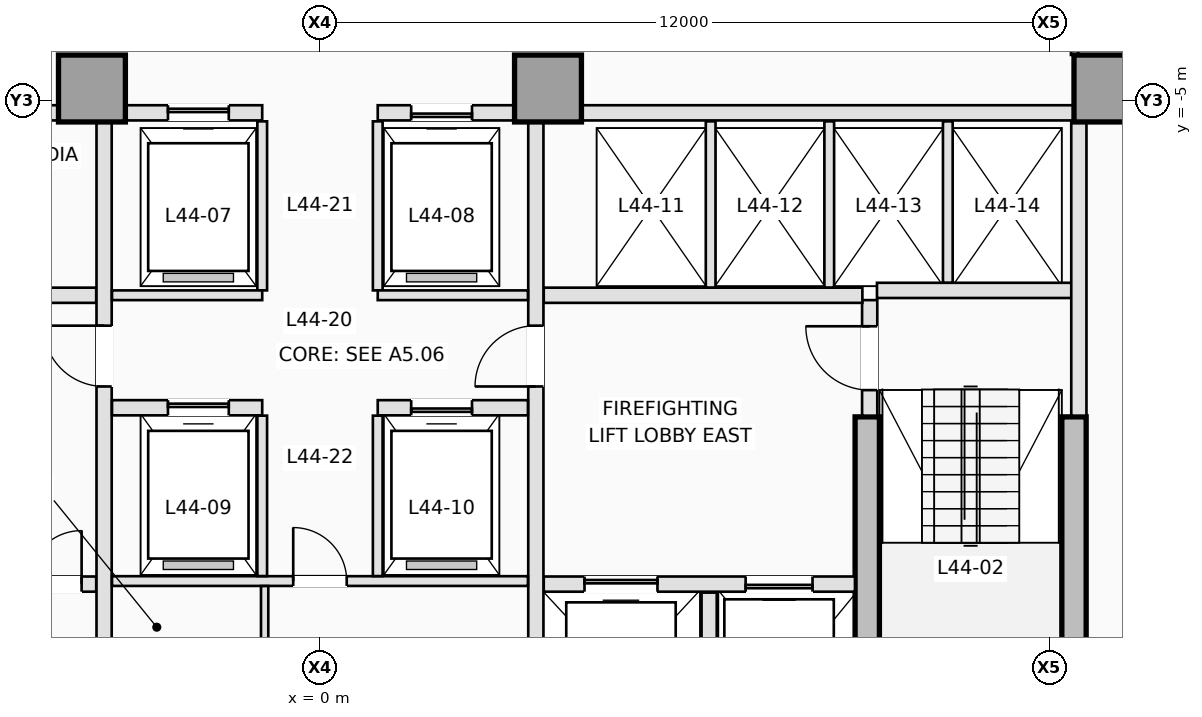
"""IFC4 building model, lengths in metres.
Left out: names, types, materials, properties, quantities, classifications, styles, units other than length and angle.
Written with IfcOpenShell. Run it as: python <this file> out.ifc"""

import sys

from ifc_helpers import new_model, si_unit, direction, frame, frame_2d, origin, origin_2d, place, context, subcontext, project, spatial, rectangle, extrude, element, fill, save


model = new_model("IFC4")
c1 = context("Model", 3, precision=1e-05, world=origin(), true_north=direction((0.0, 1.0)))
c2 = subcontext(c1, "Body", "Model", "MODEL_VIEW")
j1 = project(units=[si_unit("LENGTHUNIT", "METRE"), si_unit("PLANEANGLEUNIT", "RADIAN")], contexts=[c1])
p1 = place(None, origin())
s1 = spatial("IfcSite", under=j1, at=p1, CompositionType="ELEMENT")
p2 = place(p1, origin())
s2 = spatial("IfcBuilding", under=s1, at=p2, CompositionType="ELEMENT")
p3 = place(p2, frame((0.0, 0.0, 161.5)))
s3 = spatial("IfcBuildingStorey", under=s2, at=p3, CompositionType="ELEMENT", Elevation=161.5)
p4 = place(p3, frame((12.4, -15.7, 0.0), z_axis=(0.0, 0.0, 1.0), x_axis=(0.0, 1.0, 0.0)))
e1 = element("IfcWall", 1, at=p4, inside=s3, PredefinedType="SHEAR", context=c2, shape_type="SweptSolid", body=[
    extrude(rectangle(XDim=5.5, YDim=0.4, at=frame_2d((2.75, 0.0))), origin(), (0.0, 0.0, 1.0), 3.5),
])
p5 = place(p3, frame((9.0, -16.15, 0.0), z_axis=(0.0, 0.0, 1.0), x_axis=(0.0, 1.0, 0.0)))
e2 = element("IfcWall", 2, at=p5, inside=s3, PredefinedType="SHEAR", context=c2, shape_type="SweptSolid", body=[
    extrude(rectangle(XDim=5.95, YDim=0.4, at=frame_2d((2.975, 0.0))), origin(), (0.0, 0.0, 1.0), 3.5),
])
for number, where, z_axis, x_axis in (
    (3, (-3.75, -4.8, 0.0), (0.0, 0.0, 1.0), (1.0, 0.0, 0.0)),
    (4, (3.75, -4.8, 0.0), (0.0, 0.0, 1.0), (1.0, 0.0, 0.0)),
    (5, (12.95, -4.8, 0.0), (0.0, 0.0, 1.0), (1.0, 0.0, 0.0)),
):
    element("IfcColumn", number, at=place(p3, frame(where, z_axis=z_axis, x_axis=x_axis)), inside=s3, PredefinedType="COLUMN", context=c2, shape_type="SweptSolid", body=[
        extrude(rectangle(XDim=1.1, YDim=1.1, at=origin_2d()), origin(), (0.0, 0.0, 1.0), 3.5),
    ])
p6 = place(p3, frame((9.04, -10.18, 0.0), z_axis=(0.0, 0.0, 1.0), x_axis=(0.0, 1.0, 0.0)))
e6 = element("IfcWall", 6, at=p6, inside=s3, PredefinedType="PARTITIONING", context=c2, shape_type="SweptSolid", body=[
    extrude(rectangle(XDim=1.9, YDim=0.25, at=frame_2d((0.95, 0.0))), origin(), (0.0, 0.0, 1.0), 3.25),
])
p7 = place(p6, frame((0.42, 0.0, 0.0)))
e7 = element("IfcOpeningElement", 7, at=p7, cuts=e6, PredefinedType="OPENING", context=c2, shape_type="SweptSolid", body=[
    extrude(rectangle(XDim=1.05, YDim=2.15, at=frame_2d((0.525, 1.075))), frame((0.0, 0.135, 0.0), z_axis=(0.0, -1.0, 0.0), x_axis=(1.0, 0.0, 0.0)), (0.0, 0.0, 1.0), 0.27),
])
p8 = place(p3, frame((9.16, -8.12, 0.0), z_axis=(0.0, 0.0, 1.0), x_axis=(1.0, 0.0, 0.0)))
e8 = element("IfcWall", 8, at=p8, inside=s3, PredefinedType="PARTITIONING", context=c2, shape_type="SweptSolid", body=[
    extrude(rectangle(XDim=3.22, YDim=0.25, at=frame_2d((1.61, 0.0))), origin(), (0.0, 0.0, 1.0), 3.25),
])
p9 = place(p3, frame((12.48, -10.18, 0.0), z_axis=(0.0, 0.0, 1.0), x_axis=(0.0, 1.0, 0.0)))
e9 = element("IfcWall", 9, at=p9, inside=s3, PredefinedType="PARTITIONING", context=c2, shape_type="SweptSolid", body=[
    extrude(rectangle(XDim=4.828, YDim=0.25, at=frame_2d((2.414, 0.0))), origin(), (0.0, 0.0, 1.0), 3.25),
])
p10 = place(p3, frame((-8.798, -12.95, 0.0), z_axis=(0.0, 0.0, 1.0), x_axis=(1.0, 0.0, 0.0)))
e10 = element("IfcWall", 10, at=p10, inside=s3, PredefinedType="PARTITIONING", context=c2, shape_type="SweptSolid", body=[
    extrude(rectangle(XDim=5.118, YDim=0.25, at=frame_2d((2.559, 0.0))), origin(), (0.0, 0.0, 1.0), 3.25),
])
p11 = place(p10, frame((0.698, 0.0, 0.0)))
e11 = element("IfcOpeningElement", 11, at=p11, cuts=e10, PredefinedType="OPENING", context=c2, shape_type="SweptSolid", body=[
    extrude(rectangle(XDim=1.1, YDim=2.15, at=frame_2d((0.55, 1.075))), frame((0.0, 0.135, 0.0), z_axis=(0.0, -1.0, 0.0), x_axis=(1.0, 0.0, 0.0)), (0.0, 0.0, 1.0), 0.27),
])
p12 = place(p10, frame((2.598, 0.0, 0.0)))
e12 = element("IfcOpeningElement", 12, at=p12, cuts=e10, PredefinedType="OPENING", context=c2, shape_type="SweptSolid", body=[
    extrude(rectangle(XDim=0.88, YDim=2.1, at=frame_2d((0.44, 1.05))), frame((0.0, 0.135, 0.0), z_axis=(0.0, -1.0, 0.0), x_axis=(1.0, 0.0, 0.0)), (0.0, 0.0, 1.0), 0.27),
])
p13 = place(p10, frame((3.998, 0.0, 0.0)))
e13 = element("IfcOpeningElement", 13, at=p13, cuts=e10, PredefinedType="OPENING", context=c2, shape_type="SweptSolid", body=[
    extrude(rectangle(XDim=0.88, YDim=2.1, at=frame_2d((0.44, 1.05))), frame((0.0, 0.135, 0.0), z_axis=(0.0, -1.0, 0.0), x_axis=(1.0, 0.0, 0.0)), (0.0, 0.0, 1.0), 0.27),
])
p14 = place(p3, frame((3.68, -12.95, 0.0), z_axis=(0.0, 0.0, 1.0), x_axis=(1.0, 0.0, 0.0)))
e14 = element("IfcWall", 14, at=p14, inside=s3, PredefinedType="PARTITIONING", context=c2, shape_type="SweptSolid", body=[
    extrude(rectangle(XDim=5.118, YDim=0.25, at=frame_2d((2.559, 0.0))), origin(), (0.0, 0.0, 1.0), 3.25),
])
p15 = place(p14, frame((3.32, 0.0, 0.0)))
e15 = element("IfcOpeningElement", 15, at=p15, cuts=e14, PredefinedType="OPENING", context=c2, shape_type="SweptSolid", body=[
    extrude(rectangle(XDim=1.1, YDim=2.15, at=frame_2d((0.55, 1.075))), frame((0.0, 0.135, 0.0), z_axis=(0.0, -1.0, 0.0), x_axis=(1.0, 0.0, 0.0)), (0.0, 0.0, 1.0), 0.27),
])
p16 = place(p14, frame((0.67, 0.0, 0.0)))
e16 = element("IfcOpeningElement", 16, at=p16, cuts=e14, PredefinedType="OPENING", context=c2, shape_type="SweptSolid", body=[
    extrude(rectangle(XDim=1.2, YDim=2.15, at=frame_2d((0.6, 1.075))), frame((0.0, 0.135, 0.0), z_axis=(0.0, -1.0, 0.0), x_axis=(1.0, 0.0, 0.0)), (0.0, 0.0, 1.0), 0.27),
])
p17 = place(p3, frame((6.4, -15.92, 0.0), z_axis=(0.0, 0.0, 1.0), x_axis=(0.0, 1.0, 0.0)))
e17 = element("IfcWall", 17, at=p17, inside=s3, PredefinedType="PARTITIONING", context=c2, shape_type="SweptSolid", body=[
    extrude(rectangle(XDim=2.83, YDim=0.25, at=frame_2d((1.415, 0.0))), origin(), (0.0, 0.0, 1.0), 3.25),
])
for number, where, z_axis, x_axis in (
    (18, (-8.92, -8.2, 0.0), (0.0, 0.0, 1.0), (1.0, 0.0, 0.0)),
    (19, (3.68, -8.2, 0.0), (0.0, 0.0, 1.0), (1.0, 0.0, 0.0)),
):
    element("IfcWall", number, at=place(p3, frame(where, z_axis=z_axis, x_axis=x_axis)), inside=s3, PredefinedType="PARTITIONING", context=c2, shape_type="SweptSolid", body=[
        extrude(rectangle(XDim=5.24, YDim=0.25, at=frame_2d((2.62, 0.0))), origin(), (0.0, 0.0, 1.0), 3.25),
    ])
p18 = place(p3, frame((-3.55, -15.798, 0.0), z_axis=(0.0, 0.0, 1.0), x_axis=(0.0, 1.0, 0.0)))
e20 = element("IfcWall", 20, at=p18, inside=s3, PredefinedType="PARTITIONING", context=c2, shape_type="SweptSolid", body=[
    extrude(rectangle(XDim=10.446, YDim=0.25, at=frame_2d((5.223, 0.0))), origin(), (0.0, 0.0, 1.0), 3.25),
])
p19 = place(p18, frame((6.098, 0.0, 0.0)))
e21 = element("IfcOpeningElement", 21, at=p19, cuts=e20, PredefinedType="OPENING", context=c2, shape_type="SweptSolid", body=[
    extrude(rectangle(XDim=1.0, YDim=2.15, at=frame_2d((0.5, 1.075))), frame((0.0, 0.135, 0.0), z_axis=(0.0, -1.0, 0.0), x_axis=(1.0, 0.0, 0.0)), (0.0, 0.0, 1.0), 0.27),
])
p20 = place(p3, frame((3.55, -15.798, 0.0), z_axis=(0.0, 0.0, 1.0), x_axis=(0.0, 1.0, 0.0)))
e22 = element("IfcWall", 22, at=p20, inside=s3, PredefinedType="PARTITIONING", context=c2, shape_type="SweptSolid", body=[
    extrude(rectangle(XDim=10.446, YDim=0.25, at=frame_2d((5.223, 0.0))), origin(), (0.0, 0.0, 1.0), 3.25),
])
p21 = place(p20, frame((6.098, 0.0, 0.0)))
e23 = element("IfcOpeningElement", 23, at=p21, cuts=e22, PredefinedType="OPENING", context=c2, shape_type="SweptSolid", body=[
    extrude(rectangle(XDim=1.0, YDim=2.15, at=frame_2d((0.5, 1.075))), frame((0.0, 0.135, 0.0), z_axis=(0.0, -1.0, 0.0), x_axis=(1.0, 0.0, 0.0)), (0.0, 0.0, 1.0), 0.27),
])
p22 = place(p3, frame((-12.398, -5.2, 0.0), z_axis=(0.0, 0.0, 1.0), x_axis=(1.0, 0.0, 0.0)))
e24 = element("IfcWall", 24, at=p22, inside=s3, PredefinedType="PARTITIONING", context=c2, shape_type="SweptSolid", body=[
    extrude(rectangle(XDim=8.096, YDim=0.25, at=frame_2d((4.048, 0.0))), origin(), (0.0, 0.0, 1.0), 3.25),
])
p23 = place(p22, frame((2.968, 0.0, 0.0)))
e25 = element("IfcOpeningElement", 25, at=p23, cuts=e24, PredefinedType="OPENING", context=c2, shape_type="SweptSolid", body=[
    extrude(rectangle(XDim=0.92, YDim=2.12, at=frame_2d((0.46, 1.06))), frame((0.0, 0.135, 0.0), z_axis=(0.0, -1.0, 0.0), x_axis=(1.0, 0.0, 0.0)), (0.0, 0.0, 1.0), 0.27),
])
p24 = place(p22, frame((6.068, 0.0, 0.0)))
e26 = element("IfcOpeningElement", 26, at=p24, cuts=e24, PredefinedType="OPENING", context=c2, shape_type="SweptSolid", body=[
    extrude(rectangle(XDim=0.92, YDim=2.12, at=frame_2d((0.46, 1.06))), frame((0.0, 0.135, 0.0), z_axis=(0.0, -1.0, 0.0), x_axis=(1.0, 0.0, 0.0)), (0.0, 0.0, 1.0), 0.27),
])
p25 = place(p3, frame((4.302, -5.2, 0.0), z_axis=(0.0, 0.0, 1.0), x_axis=(1.0, 0.0, 0.0)))
e27 = element("IfcWall", 27, at=p25, inside=s3, PredefinedType="PARTITIONING", context=c2, shape_type="SweptSolid", body=[
    extrude(rectangle(XDim=8.096, YDim=0.25, at=frame_2d((4.048, 0.0))), origin(), (0.0, 0.0, 1.0), 3.25),
])
p26 = place(p3, frame((-3.198, -5.2, 0.0), z_axis=(0.0, 0.0, 1.0), x_axis=(1.0, 0.0, 0.0)))
e28 = element("IfcWall", 28, at=p26, inside=s3, PredefinedType="PARTITIONING", context=c2, shape_type="SweptSolid", body=[
    extrude(rectangle(XDim=2.248, YDim=0.25, at=frame_2d((1.124, 0.0))), origin(), (0.0, 0.0, 1.0), 3.25),
])
p27 = place(p26, frame((0.698, 0.0, 0.0)))
e29 = element("IfcOpeningElement", 29, at=p27, cuts=e28, PredefinedType="OPENING", context=c2, shape_type="SweptSolid", body=[
    extrude(rectangle(XDim=1.0, YDim=2.15, at=frame_2d((0.5, 1.075))), frame((0.0, 0.135, 0.0), z_axis=(0.0, -1.0, 0.0), x_axis=(1.0, 0.0, 0.0)), (0.0, 0.0, 1.0), 0.27),
])
p28 = place(p3, frame((0.95, -5.2, 0.0), z_axis=(0.0, 0.0, 1.0), x_axis=(1.0, 0.0, 0.0)))
e30 = element("IfcWall", 30, at=p28, inside=s3, PredefinedType="PARTITIONING", context=c2, shape_type="SweptSolid", body=[
    extrude(rectangle(XDim=2.248, YDim=0.25, at=frame_2d((1.124, 0.0))), origin(), (0.0, 0.0, 1.0), 3.25),
])
p29 = place(p28, frame((0.55, 0.0, 0.0)))
e31 = element("IfcOpeningElement", 31, at=p29, cuts=e30, PredefinedType="OPENING", context=c2, shape_type="SweptSolid", body=[
    extrude(rectangle(XDim=1.0, YDim=2.15, at=frame_2d((0.5, 1.075))), frame((0.0, 0.135, 0.0), z_axis=(0.0, -1.0, 0.0), x_axis=(1.0, 0.0, 0.0)), (0.0, 0.0, 1.0), 0.27),
])
for number, where, z_axis, x_axis in (
    (32, (6.425, -8.073, 0.0), (0.0, 0.0, 1.0), (0.0, 1.0, 0.0)),
    (33, (8.375, -8.073, 0.0), (0.0, 0.0, 1.0), (0.0, 1.0, 0.0)),
):
    element("IfcWall", number, at=place(p3, frame(where, z_axis=z_axis, x_axis=x_axis)), inside=s3, PredefinedType="PARTITIONING", context=c2, shape_type="SweptSolid", body=[
        extrude(rectangle(XDim=2.733, YDim=0.16, at=frame_2d((1.366, 0.0))), origin(), (0.0, 0.0, 1.0), 3.25),
    ])
p30 = place(p3, frame((10.325, -7.993, 0.0), z_axis=(0.0, 0.0, 1.0), x_axis=(0.0, 1.0, 0.0)))
e34 = element("IfcWall", 34, at=p30, inside=s3, PredefinedType="PARTITIONING", context=c2, shape_type="SweptSolid", body=[
    extrude(rectangle(XDim=2.653, YDim=0.16, at=frame_2d((1.326, 0.0))), origin(), (0.0, 0.0, 1.0), 3.25),
])
for number, where, z_axis, x_axis in (
    (35, (-0.95, -8.12, 0.0), (0.0, 0.0, 1.0), (0.0, 1.0, 0.0)),
    (36, (0.95, -8.12, 0.0), (0.0, 0.0, 1.0), (0.0, 1.0, 0.0)),
):
    element("IfcWall", number, at=place(p3, frame(where, z_axis=z_axis, x_axis=x_axis)), inside=s3, PredefinedType="PARTITIONING", context=c2, shape_type="SweptSolid", body=[
        extrude(rectangle(XDim=2.78, YDim=0.16, at=frame_2d((1.39, 0.0))), origin(), (0.0, 0.0, 1.0), 3.25),
    ])
for number, where, z_axis, x_axis in (
    (37, (-3.42, -8.2, 0.0), (0.0, 0.0, 1.0), (1.0, 0.0, 0.0)),
    (38, (0.95, -8.2, 0.0), (0.0, 0.0, 1.0), (1.0, 0.0, 0.0)),
):
    element("IfcWall", number, at=place(p3, frame(where, z_axis=z_axis, x_axis=x_axis)), inside=s3, PredefinedType="PARTITIONING", context=c2, shape_type="SweptSolid", body=[
        extrude(rectangle(XDim=2.47, YDim=0.16, at=frame_2d((1.235, 0.0))), origin(), (0.0, 0.0, 1.0), 3.25),
    ])
p31 = place(p3, frame((-3.42, -10.05, 0.0), z_axis=(0.0, 0.0, 1.0), x_axis=(1.0, 0.0, 0.0)))
e39 = element("IfcWall", 39, at=p31, inside=s3, PredefinedType="PARTITIONING", context=c2, shape_type="SweptSolid", body=[
    extrude(rectangle(XDim=2.47, YDim=0.25, at=frame_2d((1.235, 0.0))), origin(), (0.0, 0.0, 1.0), 3.25),
])
p32 = place(p31, frame((0.92, 0.0, 0.0)))
e40 = element("IfcOpeningElement", 40, at=p32, cuts=e39, PredefinedType="OPENING", context=c2, shape_type="SweptSolid", body=[
    extrude(rectangle(XDim=1.0, YDim=2.15, at=frame_2d((0.5, 1.075))), frame((0.0, 0.135, 0.0), z_axis=(0.0, -1.0, 0.0), x_axis=(1.0, 0.0, 0.0)), (0.0, 0.0, 1.0), 0.27),
])
p33 = place(p3, frame((0.95, -10.05, 0.0), z_axis=(0.0, 0.0, 1.0), x_axis=(1.0, 0.0, 0.0)))
e41 = element("IfcWall", 41, at=p33, inside=s3, PredefinedType="PARTITIONING", context=c2, shape_type="SweptSolid", body=[
    extrude(rectangle(XDim=2.47, YDim=0.25, at=frame_2d((1.235, 0.0))), origin(), (0.0, 0.0, 1.0), 3.25),
])
p34 = place(p33, frame((0.55, 0.0, 0.0)))
e42 = element("IfcOpeningElement", 42, at=p34, cuts=e41, PredefinedType="OPENING", context=c2, shape_type="SweptSolid", body=[
    extrude(rectangle(XDim=1.0, YDim=2.15, at=frame_2d((0.5, 1.075))), frame((0.0, 0.135, 0.0), z_axis=(0.0, -1.0, 0.0), x_axis=(1.0, 0.0, 0.0)), (0.0, 0.0, 1.0), 0.27),
])
p35 = place(p3, frame((-3.42, -12.9, 0.0), z_axis=(0.0, 0.0, 1.0), x_axis=(1.0, 0.0, 0.0)))
e43 = element("IfcWall", 43, at=p35, inside=s3, PredefinedType="PARTITIONING", context=c2, shape_type="SweptSolid", body=[
    extrude(rectangle(XDim=6.84, YDim=0.16, at=frame_2d((3.42, 0.0))), origin(), (0.0, 0.0, 1.0), 3.25),
])
p36 = place(p35, frame((2.98, 0.0, 0.0)))
e44 = element("IfcOpeningElement", 44, at=p36, cuts=e43, PredefinedType="OPENING", context=c2, shape_type="SweptSolid", body=[
    extrude(rectangle(XDim=0.88, YDim=2.12, at=frame_2d((0.44, 1.06))), frame((0.0, 0.09, 0.0), z_axis=(0.0, -1.0, 0.0), x_axis=(1.0, 0.0, 0.0)), (0.0, 0.0, 1.0), 0.18),
])
for number, where, z_axis, x_axis in (
    (45, (-0.95, -12.818, 0.0), (0.0, 0.0, 1.0), (0.0, 1.0, 0.0)),
    (46, (0.95, -12.818, 0.0), (0.0, 0.0, 1.0), (0.0, 1.0, 0.0)),
):
    element("IfcWall", number, at=place(p3, frame(where, z_axis=z_axis, x_axis=x_axis)), inside=s3, PredefinedType="PARTITIONING", context=c2, shape_type="SweptSolid", body=[
        extrude(rectangle(XDim=2.638, YDim=0.16, at=frame_2d((1.319, 0.0))), origin(), (0.0, 0.0, 1.0), 3.25),
    ])
p37 = place(p3, frame((-0.91, -16.02, 0.0), z_axis=(0.0, 0.0, 1.0), x_axis=(0.0, 1.0, 0.0)))
e47 = element("IfcWall", 47, at=p37, inside=s3, PredefinedType="PARTITIONING", context=c2, shape_type="SweptSolid", body=[
    extrude(rectangle(XDim=3.038, YDim=0.12, at=frame_2d((1.519, 0.0))), origin(), (0.0, 0.0, 1.0), 3.25),
])
p38 = place(p37, frame((1.05, 0.0, 0.0)))
e48 = element("IfcOpeningElement", 48, at=p38, cuts=e47, PredefinedType="OPENING", context=c2, shape_type="SweptSolid", body=[
    extrude(rectangle(XDim=0.88, YDim=2.12, at=frame_2d((0.44, 1.06))), frame((0.0, 0.07, 0.0), z_axis=(0.0, -1.0, 0.0), x_axis=(1.0, 0.0, 0.0)), (0.0, 0.0, 1.0), 0.14),
])
p39 = place(p3, frame((12.41, -2.462, 0.0), z_axis=(0.0, 0.0, 1.0), x_axis=(0.0, -1.0, 0.0)))
e49 = element("IfcWall", 49, at=p39, inside=s3, PredefinedType="PARTITIONING", context=c2, shape_type="SweptSolid", body=[
    extrude(rectangle(XDim=1.786, YDim=0.12, at=frame_2d((0.893, 0.0))), origin(), (0.0, 0.0, 1.0), 3.25),
])
p40 = place(p39, frame((0.623, 0.0, 0.0)))
e50 = element("IfcOpeningElement", 50, at=p40, cuts=e49, PredefinedType="OPENING", context=c2, shape_type="SweptSolid", body=[
    extrude(rectangle(XDim=0.92, YDim=2.12, at=frame_2d((0.46, 1.06))), frame((0.0, 0.07, 0.0), z_axis=(0.0, -1.0, 0.0), x_axis=(1.0, 0.0, 0.0)), (0.0, 0.0, 1.0), 0.14),
])
p41 = place(p27, origin())
e51 = element("IfcDoor", 51, at=p41, inside=s3, OperationType="SLIDING_TO_LEFT", PredefinedType="DOOR", context=c2, shape_type="SweptSolid", body=[
    extrude(rectangle(XDim=1.0, YDim=2.15, at=frame_2d((0.5, 1.075))), frame((0.0, 0.025, 0.0), z_axis=(0.0, -1.0, 0.0), x_axis=(1.0, 0.0, 0.0)), (0.0, 0.0, 1.0), 0.05),
])
fill(e29, e51)
p42 = place(p29, origin())
e52 = element("IfcDoor", 52, at=p42, inside=s3, OperationType="SLIDING_TO_RIGHT", PredefinedType="DOOR", context=c2, shape_type="SweptSolid", body=[
    extrude(rectangle(XDim=1.0, YDim=2.15, at=frame_2d((0.5, 1.075))), frame((0.0, 0.025, 0.0), z_axis=(0.0, -1.0, 0.0), x_axis=(1.0, 0.0, 0.0)), (0.0, 0.0, 1.0), 0.05),
])
fill(e31, e52)
p43 = place(p15, origin())
e53 = element("IfcDoor", 53, at=p43, inside=s3, OperationType="SLIDING_TO_RIGHT", PredefinedType="DOOR", context=c2, shape_type="SweptSolid", body=[
    extrude(rectangle(XDim=1.1, YDim=2.15, at=frame_2d((0.55, 1.075))), frame((0.0, 0.025, 0.0), z_axis=(0.0, -1.0, 0.0), x_axis=(1.0, 0.0, 0.0)), (0.0, 0.0, 1.0), 0.05),
])
fill(e15, e53)
p44 = place(p16, origin())
e54 = element("IfcDoor", 54, at=p44, inside=s3, OperationType="SLIDING_TO_LEFT", PredefinedType="DOOR", context=c2, shape_type="SweptSolid", body=[
    extrude(rectangle(XDim=1.2, YDim=2.15, at=frame_2d((0.6, 1.075))), frame((0.0, 0.025, 0.0), z_axis=(0.0, -1.0, 0.0), x_axis=(1.0, 0.0, 0.0)), (0.0, 0.0, 1.0), 0.05),
])
fill(e16, e54)
p45 = place(p32, origin())
e55 = element("IfcDoor", 55, at=p45, inside=s3, OperationType="SLIDING_TO_LEFT", PredefinedType="DOOR", context=c2, shape_type="SweptSolid", body=[
    extrude(rectangle(XDim=1.0, YDim=2.15, at=frame_2d((0.5, 1.075))), frame((0.0, 0.025, 0.0), z_axis=(0.0, -1.0, 0.0), x_axis=(1.0, 0.0, 0.0)), (0.0, 0.0, 1.0), 0.05),
])
fill(e40, e55)
p46 = place(p34, origin())
e56 = element("IfcDoor", 56, at=p46, inside=s3, OperationType="SLIDING_TO_RIGHT", PredefinedType="DOOR", context=c2, shape_type="SweptSolid", body=[
    extrude(rectangle(XDim=1.0, YDim=2.15, at=frame_2d((0.5, 1.075))), frame((0.0, 0.025, 0.0), z_axis=(0.0, -1.0, 0.0), x_axis=(1.0, 0.0, 0.0)), (0.0, 0.0, 1.0), 0.05),
])
fill(e42, e56)
p47 = place(p7, origin())
e57 = element("IfcDoor", 57, at=p47, inside=s3, OperationType="SINGLE_SWING_RIGHT", PredefinedType="DOOR", context=c2, shape_type="SweptSolid", body=[
    extrude(rectangle(XDim=1.05, YDim=2.15, at=frame_2d((0.525, 1.075))), frame((0.0, 0.025, 0.0), z_axis=(0.0, -1.0, 0.0), x_axis=(1.0, 0.0, 0.0)), (0.0, 0.0, 1.0), 0.05),
])
fill(e7, e57)
p48 = place(p13, origin())
e58 = element("IfcDoor", 58, at=p48, inside=s3, OperationType="SINGLE_SWING_RIGHT", PredefinedType="TRAPDOOR", context=c2, shape_type="SweptSolid", body=[
    extrude(rectangle(XDim=0.88, YDim=2.1, at=frame_2d((0.44, 1.05))), frame((0.0, 0.025, 0.0), z_axis=(0.0, -1.0, 0.0), x_axis=(1.0, 0.0, 0.0)), (0.0, 0.0, 1.0), 0.05),
])
fill(e13, e58)
p49 = place(p19, origin())
e59 = element("IfcDoor", 59, at=p49, inside=s3, OperationType="SINGLE_SWING_RIGHT", PredefinedType="DOOR", context=c2, shape_type="SweptSolid", body=[
    extrude(rectangle(XDim=1.0, YDim=2.15, at=frame_2d((0.5, 1.075))), frame((0.0, 0.025, 0.0), z_axis=(0.0, -1.0, 0.0), x_axis=(1.0, 0.0, 0.0)), (0.0, 0.0, 1.0), 0.05),
])
fill(e21, e59)
p50 = place(p21, origin())
e60 = element("IfcDoor", 60, at=p50, inside=s3, OperationType="SINGLE_SWING_LEFT", PredefinedType="DOOR", context=c2, shape_type="SweptSolid", body=[
    extrude(rectangle(XDim=1.0, YDim=2.15, at=frame_2d((0.5, 1.075))), frame((0.0, 0.025, 0.0), z_axis=(0.0, -1.0, 0.0), x_axis=(1.0, 0.0, 0.0)), (0.0, 0.0, 1.0), 0.05),
])
fill(e23, e60)
p51 = place(p36, origin())
e61 = element("IfcDoor", 61, at=p51, inside=s3, OperationType="SINGLE_SWING_LEFT", PredefinedType="DOOR", context=c2, shape_type="SweptSolid", body=[
    extrude(rectangle(XDim=0.88, YDim=2.12, at=frame_2d((0.44, 1.06))), frame((0.0, 0.025, 0.0), z_axis=(0.0, -1.0, 0.0), x_axis=(1.0, 0.0, 0.0)), (0.0, 0.0, 1.0), 0.05),
])
fill(e44, e61)
save(model, sys.argv[1])
